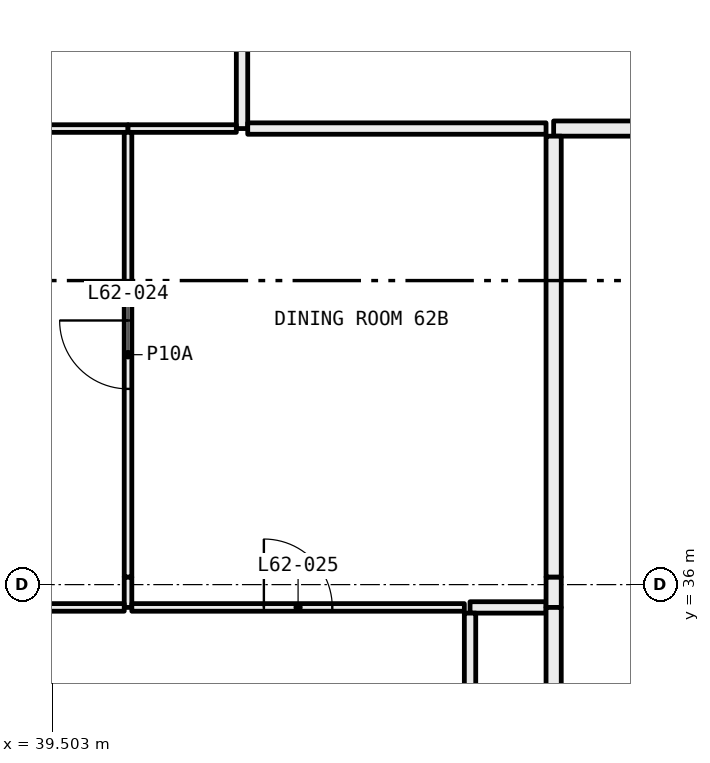
"""IFC4 building model, lengths in metres.
Left out: names, types, materials, properties, quantities, classifications, styles, units other than length and angle.
Written with IfcOpenShell. Run it as: python <this file> out.ifc"""

import sys

from ifc_helpers import new_model, si_unit, direction, frame, frame_2d, origin, place, context, subcontext, project, spatial, rectangle, extrude, element, fill, save


model = new_model("IFC4")
c1 = context("Model", 3, precision=1e-05, world=origin(), true_north=direction((0.0, 1.0)))
c2 = subcontext(c1, "Body", "Model", "MODEL_VIEW")
j1 = project(units=[si_unit("LENGTHUNIT", "METRE"), si_unit("PLANEANGLEUNIT", "RADIAN")], contexts=[c1])
p1 = place(None, origin())
s1 = spatial("IfcSite", under=j1, at=p1, CompositionType="ELEMENT")
p2 = place(p1, origin())
s2 = spatial("IfcBuilding", under=s1, at=p2, CompositionType="ELEMENT")
p3 = place(p2, frame((0.0, 0.0, 231.75)))
s3 = spatial("IfcBuildingStorey", under=s2, at=p3, CompositionType="ELEMENT", Elevation=231.75)
p4 = place(p3, frame((42.0, 42.0, 0.0), z_axis=(0.0, 0.0, 1.0), x_axis=(0.0, 1.0, 0.0)))
e1 = element("IfcWall", 1, at=p4, inside=s3, PredefinedType="PARTITIONING", context=c2, shape_type="SweptSolid", body=[
    extrude(rectangle(XDim=3.0, YDim=0.15, at=frame_2d((1.5, 0.0))), origin(), (0.0, 0.0, 1.0), 3.05),
])
p5 = place(p4, frame((1.05, 0.0, 0.0)))
e2 = element("IfcOpeningElement", 2, at=p5, cuts=e1, PredefinedType="OPENING", context=c2, shape_type="SweptSolid", body=[
    extrude(rectangle(XDim=0.9, YDim=2.1, at=frame_2d((0.45, 1.05))), frame((0.0, 0.085, 0.0), z_axis=(0.0, -1.0, 0.0), x_axis=(1.0, 0.0, 0.0)), (0.0, 0.0, 1.0), 0.17),
])
p6 = place(p3, frame((36.05, 42.0, 0.0), z_axis=(0.0, 0.0, 1.0), x_axis=(1.0, 0.0, 0.0)))
e3 = element("IfcWall", 3, at=p6, inside=s3, PredefinedType="PARTITIONING", context=c2, shape_type="SweptSolid", body=[
    extrude(rectangle(XDim=4.45, YDim=0.1, at=frame_2d((2.225, 0.0))), origin(), (0.0, 0.0, 1.0), 2.45),
])
p7 = place(p3, frame((40.5, 42.0, 0.0), z_axis=(0.0, 0.0, 1.0), x_axis=(1.0, 0.0, 0.0)))
e4 = element("IfcWall", 4, at=p7, inside=s3, PredefinedType="PARTITIONING", context=c2, shape_type="SweptSolid", body=[
    extrude(rectangle(XDim=1.425, YDim=0.1, at=frame_2d((0.712, 0.0))), origin(), (0.0, 0.0, 1.0), 3.05),
])
p8 = place(p3, frame((42.075, 42.0, 0.0), z_axis=(0.0, 0.0, 1.0), x_axis=(1.0, 0.0, 0.0)))
e5 = element("IfcWall", 5, at=p8, inside=s3, PredefinedType="PARTITIONING", context=c2, shape_type="SweptSolid", body=[
    extrude(rectangle(XDim=3.925, YDim=0.15, at=frame_2d((1.962, 0.0))), origin(), (0.0, 0.0, 1.0), 3.05),
])
p9 = place(p3, frame((46.1, 42.0, 0.0), z_axis=(0.0, 0.0, 1.0), x_axis=(1.0, 0.0, 0.0)))
e6 = element("IfcWall", 6, at=p9, inside=s3, PredefinedType="PARTITIONING", context=c2, shape_type="SweptSolid", body=[
    extrude(rectangle(XDim=1.8, YDim=0.2, at=frame_2d((0.9, 0.0))), origin(), (0.0, 0.0, 1.0), 3.05),
])
p10 = place(p3, frame((40.5, 35.7, 0.0), z_axis=(0.0, 0.0, 1.0), x_axis=(0.0, 1.0, 0.0)))
e7 = element("IfcWall", 7, at=p10, inside=s3, PredefinedType="PARTITIONING", context=c2, shape_type="SweptSolid", body=[
    extrude(rectangle(XDim=0.4, YDim=0.1, at=frame_2d((0.2, 0.0))), origin(), (0.0, 0.0, 1.0), 2.45),
])
p11 = place(p3, frame((40.5, 36.1, 0.0), z_axis=(0.0, 0.0, 1.0), x_axis=(0.0, 1.0, 0.0)))
e8 = element("IfcWall", 8, at=p11, inside=s3, PredefinedType="PARTITIONING", context=c2, shape_type="SweptSolid", body=[
    extrude(rectangle(XDim=5.85, YDim=0.1, at=frame_2d((2.925, 0.0))), origin(), (0.0, 0.0, 1.0), 3.05),
])
p12 = place(p11, frame((2.475, 0.0, 0.0)))
e9 = element("IfcOpeningElement", 9, at=p12, cuts=e8, PredefinedType="OPENING", context=c2, shape_type="SweptSolid", body=[
    extrude(rectangle(XDim=0.9, YDim=2.1, at=frame_2d((0.45, 1.05))), frame((0.0, 0.06, 0.0), z_axis=(0.0, -1.0, 0.0), x_axis=(1.0, 0.0, 0.0)), (0.0, 0.0, 1.0), 0.12),
])
p13 = place(p3, frame((36.55, 35.7, 0.0), z_axis=(0.0, 0.0, 1.0), x_axis=(1.0, 0.0, 0.0)))
e10 = element("IfcWall", 10, at=p13, inside=s3, PredefinedType="PARTITIONING", context=c2, shape_type="SweptSolid", body=[
    extrude(rectangle(XDim=3.9, YDim=0.1, at=frame_2d((1.95, 0.0))), origin(), (0.0, 0.0, 1.0), 3.05),
])
p14 = place(p3, frame((40.55, 35.7, 0.0), z_axis=(0.0, 0.0, 1.0), x_axis=(1.0, 0.0, 0.0)))
e11 = element("IfcWall", 11, at=p14, inside=s3, PredefinedType="PARTITIONING", context=c2, shape_type="SweptSolid", body=[
    extrude(rectangle(XDim=4.375, YDim=0.1, at=frame_2d((2.188, 0.0))), origin(), (0.0, 0.0, 1.0), 3.05),
])
p15 = place(p14, frame((1.738, 0.0, 0.0)))
e12 = element("IfcOpeningElement", 12, at=p15, cuts=e11, PredefinedType="OPENING", context=c2, shape_type="SweptSolid", body=[
    extrude(rectangle(XDim=0.9, YDim=2.1, at=frame_2d((0.45, 1.05))), frame((0.0, 0.06, 0.0), z_axis=(0.0, -1.0, 0.0), x_axis=(1.0, 0.0, 0.0)), (0.0, 0.0, 1.0), 0.12),
])
p16 = place(p3, frame((45.0, 35.7, 0.0), z_axis=(0.0, 0.0, 1.0), x_axis=(1.0, 0.0, 0.0)))
e13 = element("IfcWall", 13, at=p16, inside=s3, PredefinedType="PARTITIONING", context=c2, shape_type="SweptSolid", body=[
    extrude(rectangle(XDim=1.0, YDim=0.15, at=frame_2d((0.5, 0.0))), origin(), (0.0, 0.0, 1.0), 3.05),
])
p17 = place(p3, frame((46.1, 35.7, 0.0), z_axis=(0.0, 0.0, 1.0), x_axis=(0.0, 1.0, 0.0)))
e14 = element("IfcWall", 14, at=p17, inside=s3, PredefinedType="PARTITIONING", context=c2, shape_type="SweptSolid", body=[
    extrude(rectangle(XDim=0.4, YDim=0.2, at=frame_2d((0.2, 0.0))), origin(), (0.0, 0.0, 1.0), 2.45),
])
p18 = place(p3, frame((46.1, 36.1, 0.0), z_axis=(0.0, 0.0, 1.0), x_axis=(0.0, 1.0, 0.0)))
e15 = element("IfcWall", 15, at=p18, inside=s3, PredefinedType="PARTITIONING", context=c2, shape_type="SweptSolid", body=[
    extrude(rectangle(XDim=5.8, YDim=0.2, at=frame_2d((2.9, 0.0))), origin(), (0.0, 0.0, 1.0), 3.05),
])
p19 = place(p3, frame((45.0, 31.3, 0.0), z_axis=(0.0, 0.0, 1.0), x_axis=(0.0, 1.0, 0.0)))
e16 = element("IfcWall", 16, at=p19, inside=s3, PredefinedType="PARTITIONING", context=c2, shape_type="SweptSolid", body=[
    extrude(rectangle(XDim=4.325, YDim=0.15, at=frame_2d((2.163, 0.0))), origin(), (0.0, 0.0, 1.0), 3.05),
])
p20 = place(p19, frame((1.712, 0.0, 0.0)))
e17 = element("IfcOpeningElement", 17, at=p20, cuts=e16, PredefinedType="OPENING", context=c2, shape_type="SweptSolid", body=[
    extrude(rectangle(XDim=0.9, YDim=2.1, at=frame_2d((0.45, 1.05))), frame((0.0, 0.085, 0.0), z_axis=(0.0, -1.0, 0.0), x_axis=(1.0, 0.0, 0.0)), (0.0, 0.0, 1.0), 0.17),
])
p21 = place(p3, frame((46.1, 31.3, 0.0), z_axis=(0.0, 0.0, 1.0), x_axis=(0.0, 1.0, 0.0)))
e18 = element("IfcWall", 18, at=p21, inside=s3, PredefinedType="PARTITIONING", context=c2, shape_type="SweptSolid", body=[
    extrude(rectangle(XDim=4.4, YDim=0.2, at=frame_2d((2.2, 0.0))), origin(), (0.0, 0.0, 1.0), 3.05),
])
p22 = place(p12, origin())
e19 = element("IfcDoor", 19, at=p22, inside=s3, OperationType="SINGLE_SWING_LEFT", PredefinedType="DOOR", context=c2, shape_type="SweptSolid", body=[
    extrude(rectangle(XDim=0.9, YDim=2.1, at=frame_2d((0.45, 1.05))), frame((0.0, 0.025, 0.0), z_axis=(0.0, -1.0, 0.0), x_axis=(1.0, 0.0, 0.0)), (0.0, 0.0, 1.0), 0.05),
])
fill(e9, e19)
p23 = place(p15, origin())
e20 = element("IfcDoor", 20, at=p23, inside=s3, OperationType="SINGLE_SWING_RIGHT", PredefinedType="DOOR", context=c2, shape_type="SweptSolid", body=[
    extrude(rectangle(XDim=0.9, YDim=2.1, at=frame_2d((0.45, 1.05))), frame((0.0, 0.025, 0.0), z_axis=(0.0, -1.0, 0.0), x_axis=(1.0, 0.0, 0.0)), (0.0, 0.0, 1.0), 0.05),
])
fill(e12, e20)
save(model, sys.argv[1])
